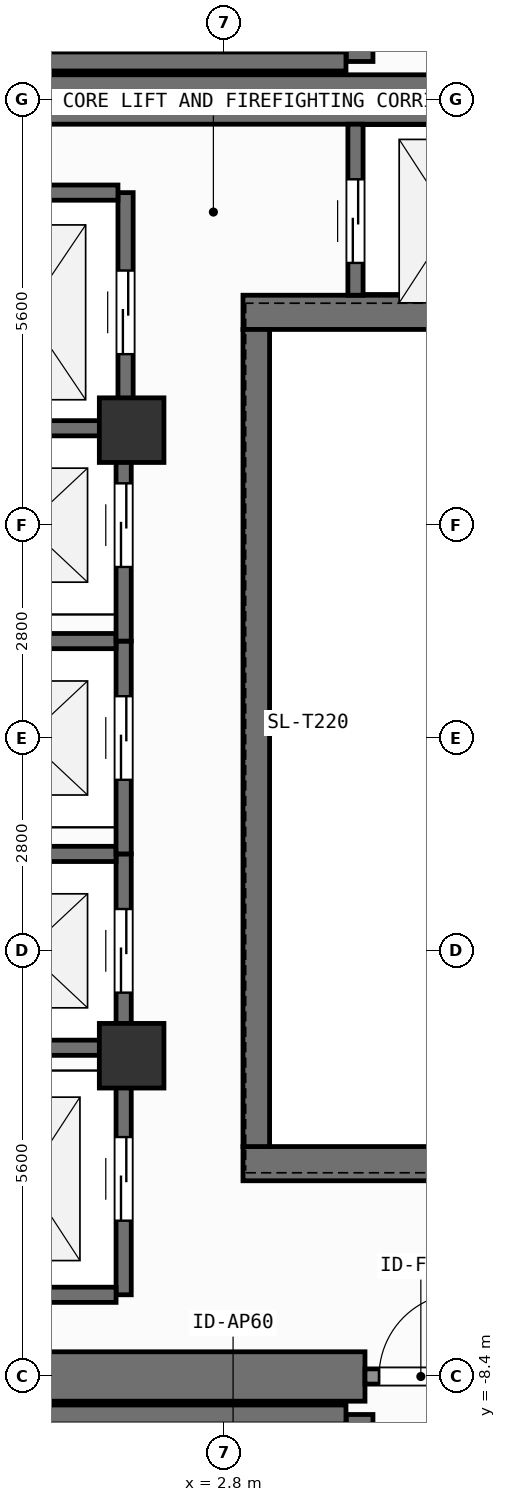
"""IFC4 building model, lengths in metres.
Left out: names, types, materials, properties, quantities, classifications, styles, units other than length and angle.
Written with IfcOpenShell. Run it as: python <this file> out.ifc"""

import sys

from ifc_helpers import new_model, si_unit, direction, frame, frame_2d, origin, origin_2d, place, context, subcontext, project, spatial, rectangle, extrude, element, fill, save


model = new_model("IFC4")
c1 = context("Model", 3, precision=1e-05, world=origin(), true_north=direction((0.0, 1.0)))
c2 = subcontext(c1, "Body", "Model", "MODEL_VIEW")
j1 = project(units=[si_unit("LENGTHUNIT", "METRE"), si_unit("PLANEANGLEUNIT", "RADIAN")], contexts=[c1])
p1 = place(None, origin())
s1 = spatial("IfcSite", under=j1, at=p1, CompositionType="ELEMENT")
p2 = place(p1, origin())
s2 = spatial("IfcBuilding", under=s1, at=p2, CompositionType="ELEMENT")
p3 = place(p2, frame((0.0, 0.0, 274.2)))
s3 = spatial("IfcBuildingStorey", under=s2, at=p3, CompositionType="ELEMENT", Elevation=274.2)
p4 = place(p3, frame((-2.62, -8.4, 0.0), z_axis=(0.0, 0.0, 1.0), x_axis=(1.0, 0.0, 0.0)))
e1 = element("IfcWall", 1, at=p4, inside=s3, PredefinedType="SHEAR", context=c2, shape_type="SweptSolid", body=[
    extrude(rectangle(XDim=7.27, YDim=0.65, at=frame_2d((3.635, 0.0))), origin(), (0.0, 0.0, 1.0), 3.9),
])
p5 = place(p3, frame((-7.55, 8.4, 0.0), z_axis=(0.0, 0.0, 1.0), x_axis=(1.0, 0.0, 0.0)))
e2 = element("IfcWall", 2, at=p5, inside=s3, PredefinedType="SHEAR", context=c2, shape_type="SweptSolid", body=[
    extrude(rectangle(XDim=16.275, YDim=0.65, at=frame_2d((8.138, 0.0))), origin(), (0.0, 0.0, 1.0), 3.9),
])
for number, where, z_axis, x_axis in (
    (3, (3.045, -5.6, 0.0), (0.0, 0.0, 1.0), (1.0, 0.0, 0.0)),
    (4, (3.045, 5.6, 0.0), (0.0, 0.0, 1.0), (1.0, 0.0, 0.0)),
):
    element("IfcWall", number, at=place(p3, frame(where, z_axis=z_axis, x_axis=x_axis)), inside=s3, PredefinedType="SHEAR", context=c2, shape_type="SweptSolid", body=[
        extrude(rectangle(XDim=5.68, YDim=0.45, at=frame_2d((2.84, 0.0))), origin(), (0.0, 0.0, 1.0), 3.9),
    ])
p6 = place(p3, frame((3.22, -5.375, 0.0), z_axis=(0.0, 0.0, 1.0), x_axis=(0.0, 1.0, 0.0)))
e5 = element("IfcWall", 5, at=p6, inside=s3, PredefinedType="SHEAR", context=c2, shape_type="SweptSolid", body=[
    extrude(rectangle(XDim=10.75, YDim=0.35, at=frame_2d((5.375, 0.0))), origin(), (0.0, 0.0, 1.0), 3.9),
])
p7 = place(p3, frame((-2.2, -8.9, 0.0), z_axis=(0.0, 0.0, 1.0), x_axis=(1.0, 0.0, 0.0)))
e6 = element("IfcWall", 6, at=p7, inside=s3, PredefinedType="SHEAR", context=c2, shape_type="SweptSolid", body=[
    extrude(rectangle(XDim=6.6, YDim=0.25, at=frame_2d((3.3, 0.0))), origin(), (0.0, 0.0, 1.0), 3.9),
])
p8 = place(p3, frame((4.58, -8.9, 0.0), z_axis=(0.0, 0.0, 1.0), x_axis=(0.0, -1.0, 0.0)))
e7 = element("IfcWall", 7, at=p8, inside=s3, PredefinedType="SHEAR", context=c2, shape_type="SweptSolid", body=[
    extrude(rectangle(XDim=2.925, YDim=0.35, at=frame_2d((1.462, 0.0))), origin(), (0.0, 0.0, 1.0), 3.9),
])
p9 = place(p8, frame((0.913, 0.0, 0.0)))
e8 = element("IfcOpeningElement", 8, at=p9, cuts=e7, PredefinedType="OPENING", context=c2, shape_type="SweptSolid", body=[
    extrude(rectangle(XDim=1.1, YDim=2.15, at=frame_2d((0.55, 1.075))), frame((0.0, 0.185, 0.0), z_axis=(0.0, -1.0, 0.0), x_axis=(1.0, 0.0, 0.0)), (0.0, 0.0, 1.0), 0.37),
])
p10 = place(p3, frame((-2.2, 8.9, 0.0), z_axis=(0.0, 0.0, 1.0), x_axis=(1.0, 0.0, 0.0)))
e9 = element("IfcWall", 9, at=p10, inside=s3, PredefinedType="SHEAR", context=c2, shape_type="SweptSolid", body=[
    extrude(rectangle(XDim=6.6, YDim=0.25, at=frame_2d((3.3, 0.0))), origin(), (0.0, 0.0, 1.0), 3.9),
])
p11 = place(p3, frame((4.58, 11.825, 0.0), z_axis=(0.0, 0.0, 1.0), x_axis=(0.0, -1.0, 0.0)))
e10 = element("IfcWall", 10, at=p11, inside=s3, PredefinedType="SHEAR", context=c2, shape_type="SweptSolid", body=[
    extrude(rectangle(XDim=2.925, YDim=0.35, at=frame_2d((1.462, 0.0))), origin(), (0.0, 0.0, 1.0), 3.9),
])
p12 = place(p11, frame((0.913, 0.0, 0.0)))
e11 = element("IfcOpeningElement", 11, at=p12, cuts=e10, PredefinedType="OPENING", context=c2, shape_type="SweptSolid", body=[
    extrude(rectangle(XDim=1.1, YDim=2.15, at=frame_2d((0.55, 1.075))), frame((0.0, 0.185, 0.0), z_axis=(0.0, -1.0, 0.0), x_axis=(1.0, 0.0, 0.0)), (0.0, 0.0, 1.0), 0.37),
])
for number, where, z_axis, x_axis in (
    (12, (1.58, -4.18, 0.0), (0.0, 0.0, 1.0), (1.0, 0.0, 0.0)),
    (13, (1.58, 4.05, 0.0), (0.0, 0.0, 1.0), (1.0, 0.0, 0.0)),
):
    element("IfcColumn", number, at=place(p3, frame(where, z_axis=z_axis, x_axis=x_axis)), inside=s3, PredefinedType="COLUMN", context=c2, shape_type="SweptSolid", body=[
        extrude(rectangle(XDim=0.85, YDim=0.85, at=origin_2d()), origin(), (0.0, 0.0, 1.0), 3.9),
    ])
p13 = place(p3, frame((1.475, -4.275, 0.0), z_axis=(0.0, 0.0, 1.0), x_axis=(0.0, 1.0, 0.0)))
e14 = element("IfcWall", 14, at=p13, inside=s3, PredefinedType="SHEAR", context=c2, shape_type="SweptSolid", body=[
    extrude(rectangle(XDim=2.75, YDim=0.2, at=frame_2d((1.375, 0.0))), origin(), (0.0, 0.0, 1.0), 3.68),
])
p14 = place(p13, frame((0.925, 0.0, 0.0)))
e15 = element("IfcOpeningElement", 15, at=p14, cuts=e14, PredefinedType="OPENING", context=c2, shape_type="SweptSolid", body=[
    extrude(rectangle(XDim=1.1, YDim=2.2, at=frame_2d((0.55, 1.1))), frame((0.0, 0.11, 0.0), z_axis=(0.0, -1.0, 0.0), x_axis=(1.0, 0.0, 0.0)), (0.0, 0.0, 1.0), 0.22),
])
for number, where, z_axis, x_axis in (
    (16, (-0.975, -4.075, 0.0), (0.0, 0.0, 1.0), (1.0, 0.0, 0.0)),
    (17, (-0.975, -1.525, 0.0), (0.0, 0.0, 1.0), (1.0, 0.0, 0.0)),
):
    element("IfcWall", number, at=place(p3, frame(where, z_axis=z_axis, x_axis=x_axis)), inside=s3, PredefinedType="SHEAR", context=c2, shape_type="SweptSolid", body=[
        extrude(rectangle(XDim=2.35, YDim=0.2, at=frame_2d((1.175, 0.0))), origin(), (0.0, 0.0, 1.0), 3.68),
    ])
p15 = place(p3, frame((1.475, -1.525, 0.0), z_axis=(0.0, 0.0, 1.0), x_axis=(0.0, 1.0, 0.0)))
e18 = element("IfcWall", 18, at=p15, inside=s3, PredefinedType="SHEAR", context=c2, shape_type="SweptSolid", body=[
    extrude(rectangle(XDim=2.8, YDim=0.2, at=frame_2d((1.4, 0.0))), origin(), (0.0, 0.0, 1.0), 3.68),
])
p16 = place(p15, frame((0.975, 0.0, 0.0)))
e19 = element("IfcOpeningElement", 19, at=p16, cuts=e18, PredefinedType="OPENING", context=c2, shape_type="SweptSolid", body=[
    extrude(rectangle(XDim=1.1, YDim=2.2, at=frame_2d((0.55, 1.1))), frame((0.0, 0.11, 0.0), z_axis=(0.0, -1.0, 0.0), x_axis=(1.0, 0.0, 0.0)), (0.0, 0.0, 1.0), 0.22),
])
p17 = place(p3, frame((-0.975, 1.275, 0.0), z_axis=(0.0, 0.0, 1.0), x_axis=(1.0, 0.0, 0.0)))
e20 = element("IfcWall", 20, at=p17, inside=s3, PredefinedType="SHEAR", context=c2, shape_type="SweptSolid", body=[
    extrude(rectangle(XDim=2.35, YDim=0.2, at=frame_2d((1.175, 0.0))), origin(), (0.0, 0.0, 1.0), 3.68),
])
p18 = place(p3, frame((1.475, 1.275, 0.0), z_axis=(0.0, 0.0, 1.0), x_axis=(0.0, 1.0, 0.0)))
e21 = element("IfcWall", 21, at=p18, inside=s3, PredefinedType="SHEAR", context=c2, shape_type="SweptSolid", body=[
    extrude(rectangle(XDim=2.8, YDim=0.2, at=frame_2d((1.4, 0.0))), origin(), (0.0, 0.0, 1.0), 3.68),
])
p19 = place(p18, frame((0.975, 0.0, 0.0)))
e22 = element("IfcOpeningElement", 22, at=p19, cuts=e21, PredefinedType="OPENING", context=c2, shape_type="SweptSolid", body=[
    extrude(rectangle(XDim=1.1, YDim=2.2, at=frame_2d((0.55, 1.1))), frame((0.0, 0.11, 0.0), z_axis=(0.0, -1.0, 0.0), x_axis=(1.0, 0.0, 0.0)), (0.0, 0.0, 1.0), 0.22),
])
p20 = place(p3, frame((-0.975, 4.075, 0.0), z_axis=(0.0, 0.0, 1.0), x_axis=(1.0, 0.0, 0.0)))
e23 = element("IfcWall", 23, at=p20, inside=s3, PredefinedType="SHEAR", context=c2, shape_type="SweptSolid", body=[
    extrude(rectangle(XDim=2.35, YDim=0.2, at=frame_2d((1.175, 0.0))), origin(), (0.0, 0.0, 1.0), 3.68),
])
p21 = place(p3, frame((1.5, 4.025, 0.0), z_axis=(0.0, 0.0, 1.0), x_axis=(0.0, 1.0, 0.0)))
e24 = element("IfcWall", 24, at=p21, inside=s3, PredefinedType="SHEAR", context=c2, shape_type="SweptSolid", body=[
    extrude(rectangle(XDim=3.15, YDim=0.2, at=frame_2d((1.575, 0.0))), origin(), (0.0, 0.0, 1.0), 3.68),
])
p22 = place(p21, frame((1.025, 0.0, 0.0)))
e25 = element("IfcOpeningElement", 25, at=p22, cuts=e24, PredefinedType="OPENING", context=c2, shape_type="SweptSolid", body=[
    extrude(rectangle(XDim=1.1, YDim=2.2, at=frame_2d((0.55, 1.1))), frame((0.0, 0.11, 0.0), z_axis=(0.0, -1.0, 0.0), x_axis=(1.0, 0.0, 0.0)), (0.0, 0.0, 1.0), 0.22),
])
p23 = place(p3, frame((-1.0, 7.175, 0.0), z_axis=(0.0, 0.0, 1.0), x_axis=(1.0, 0.0, 0.0)))
e26 = element("IfcWall", 26, at=p23, inside=s3, PredefinedType="SHEAR", context=c2, shape_type="SweptSolid", body=[
    extrude(rectangle(XDim=2.4, YDim=0.2, at=frame_2d((1.2, 0.0))), origin(), (0.0, 0.0, 1.0), 3.68),
])
p24 = place(p3, frame((1.475, -7.325, 0.0), z_axis=(0.0, 0.0, 1.0), x_axis=(0.0, 1.0, 0.0)))
e27 = element("IfcWall", 27, at=p24, inside=s3, PredefinedType="SHEAR", context=c2, shape_type="SweptSolid", body=[
    extrude(rectangle(XDim=3.05, YDim=0.2, at=frame_2d((1.525, 0.0))), origin(), (0.0, 0.0, 1.0), 3.68),
])
p25 = place(p24, frame((0.975, 0.0, 0.0)))
e28 = element("IfcOpeningElement", 28, at=p25, cuts=e27, PredefinedType="OPENING", context=c2, shape_type="SweptSolid", body=[
    extrude(rectangle(XDim=1.1, YDim=2.2, at=frame_2d((0.55, 1.1))), frame((0.0, 0.11, 0.0), z_axis=(0.0, -1.0, 0.0), x_axis=(1.0, 0.0, 0.0)), (0.0, 0.0, 1.0), 0.22),
])
p26 = place(p3, frame((-0.975, -7.325, 0.0), z_axis=(0.0, 0.0, 1.0), x_axis=(1.0, 0.0, 0.0)))
e29 = element("IfcWall", 29, at=p26, inside=s3, PredefinedType="SHEAR", context=c2, shape_type="SweptSolid", body=[
    extrude(rectangle(XDim=2.35, YDim=0.2, at=frame_2d((1.175, 0.0))), origin(), (0.0, 0.0, 1.0), 3.68),
])
p27 = place(p3, frame((4.525, 5.825, 0.0), z_axis=(0.0, 0.0, 1.0), x_axis=(0.0, 1.0, 0.0)))
e30 = element("IfcWall", 30, at=p27, inside=s3, PredefinedType="SHEAR", context=c2, shape_type="SweptSolid", body=[
    extrude(rectangle(XDim=2.25, YDim=0.2, at=frame_2d((1.125, 0.0))), origin(), (0.0, 0.0, 1.0), 3.68),
])
p28 = place(p27, frame((0.425, 0.0, 0.0)))
e31 = element("IfcOpeningElement", 31, at=p28, cuts=e30, PredefinedType="OPENING", context=c2, shape_type="SweptSolid", body=[
    extrude(rectangle(XDim=1.1, YDim=2.2, at=frame_2d((0.55, 1.1))), frame((0.0, 0.11, 0.0), z_axis=(0.0, -1.0, 0.0), x_axis=(1.0, 0.0, 0.0)), (0.0, 0.0, 1.0), 0.22),
])
p29 = place(p3, frame((4.65, -8.4, 0.0), z_axis=(0.0, 0.0, 1.0), x_axis=(1.0, 0.0, 0.0)))
e32 = element("IfcWall", 32, at=p29, inside=s3, PredefinedType="SOLIDWALL", context=c2, shape_type="SweptSolid", body=[
    extrude(rectangle(XDim=1.47, YDim=0.2, at=frame_2d((0.735, 0.0))), origin(), (0.0, 0.0, 1.0), 2.92),
])
p30 = place(p29, frame((0.185, 0.0, 0.0)))
e33 = element("IfcOpeningElement", 33, at=p30, cuts=e32, PredefinedType="OPENING", context=c2, shape_type="SweptSolid", body=[
    extrude(rectangle(XDim=1.1, YDim=2.15, at=frame_2d((0.55, 1.075))), frame((0.0, 0.11, 0.0), z_axis=(0.0, -1.0, 0.0), x_axis=(1.0, 0.0, 0.0)), (0.0, 0.0, 1.0), 0.22),
])
p31 = place(p14, origin())
e34 = element("IfcDoor", 34, at=p31, inside=s3, OperationType="SLIDING_TO_LEFT", PredefinedType="DOOR", context=c2, shape_type="SweptSolid", body=[
    extrude(rectangle(XDim=1.1, YDim=2.2, at=frame_2d((0.55, 1.1))), frame((0.0, 0.025, 0.0), z_axis=(0.0, -1.0, 0.0), x_axis=(1.0, 0.0, 0.0)), (0.0, 0.0, 1.0), 0.05),
])
fill(e15, e34)
p32 = place(p16, origin())
e35 = element("IfcDoor", 35, at=p32, inside=s3, OperationType="SLIDING_TO_LEFT", PredefinedType="DOOR", context=c2, shape_type="SweptSolid", body=[
    extrude(rectangle(XDim=1.1, YDim=2.2, at=frame_2d((0.55, 1.1))), frame((0.0, 0.025, 0.0), z_axis=(0.0, -1.0, 0.0), x_axis=(1.0, 0.0, 0.0)), (0.0, 0.0, 1.0), 0.05),
])
fill(e19, e35)
p33 = place(p19, origin())
e36 = element("IfcDoor", 36, at=p33, inside=s3, OperationType="SLIDING_TO_LEFT", PredefinedType="DOOR", context=c2, shape_type="SweptSolid", body=[
    extrude(rectangle(XDim=1.1, YDim=2.2, at=frame_2d((0.55, 1.1))), frame((0.0, 0.025, 0.0), z_axis=(0.0, -1.0, 0.0), x_axis=(1.0, 0.0, 0.0)), (0.0, 0.0, 1.0), 0.05),
])
fill(e22, e36)
p34 = place(p22, origin())
e37 = element("IfcDoor", 37, at=p34, inside=s3, OperationType="SLIDING_TO_LEFT", PredefinedType="DOOR", context=c2, shape_type="SweptSolid", body=[
    extrude(rectangle(XDim=1.1, YDim=2.2, at=frame_2d((0.55, 1.1))), frame((0.0, 0.025, 0.0), z_axis=(0.0, -1.0, 0.0), x_axis=(1.0, 0.0, 0.0)), (0.0, 0.0, 1.0), 0.05),
])
fill(e25, e37)
p35 = place(p25, origin())
e38 = element("IfcDoor", 38, at=p35, inside=s3, OperationType="SLIDING_TO_LEFT", PredefinedType="DOOR", context=c2, shape_type="SweptSolid", body=[
    extrude(rectangle(XDim=1.1, YDim=2.2, at=frame_2d((0.55, 1.1))), frame((0.0, 0.025, 0.0), z_axis=(0.0, -1.0, 0.0), x_axis=(1.0, 0.0, 0.0)), (0.0, 0.0, 1.0), 0.05),
])
fill(e28, e38)
p36 = place(p28, origin())
e39 = element("IfcDoor", 39, at=p36, inside=s3, OperationType="SLIDING_TO_LEFT", PredefinedType="DOOR", context=c2, shape_type="SweptSolid", body=[
    extrude(rectangle(XDim=1.1, YDim=2.2, at=frame_2d((0.55, 1.1))), frame((0.0, 0.025, 0.0), z_axis=(0.0, -1.0, 0.0), x_axis=(1.0, 0.0, 0.0)), (0.0, 0.0, 1.0), 0.05),
])
fill(e31, e39)
p37 = place(p30, origin())
e40 = element("IfcDoor", 40, at=p37, inside=s3, OperationType="SINGLE_SWING_RIGHT", PredefinedType="DOOR", context=c2, shape_type="SweptSolid", body=[
    extrude(rectangle(XDim=1.1, YDim=2.15, at=frame_2d((0.55, 1.075))), frame((0.0, 0.025, 0.0), z_axis=(0.0, -1.0, 0.0), x_axis=(1.0, 0.0, 0.0)), (0.0, 0.0, 1.0), 0.05),
])
fill(e33, e40)
save(model, sys.argv[1])
